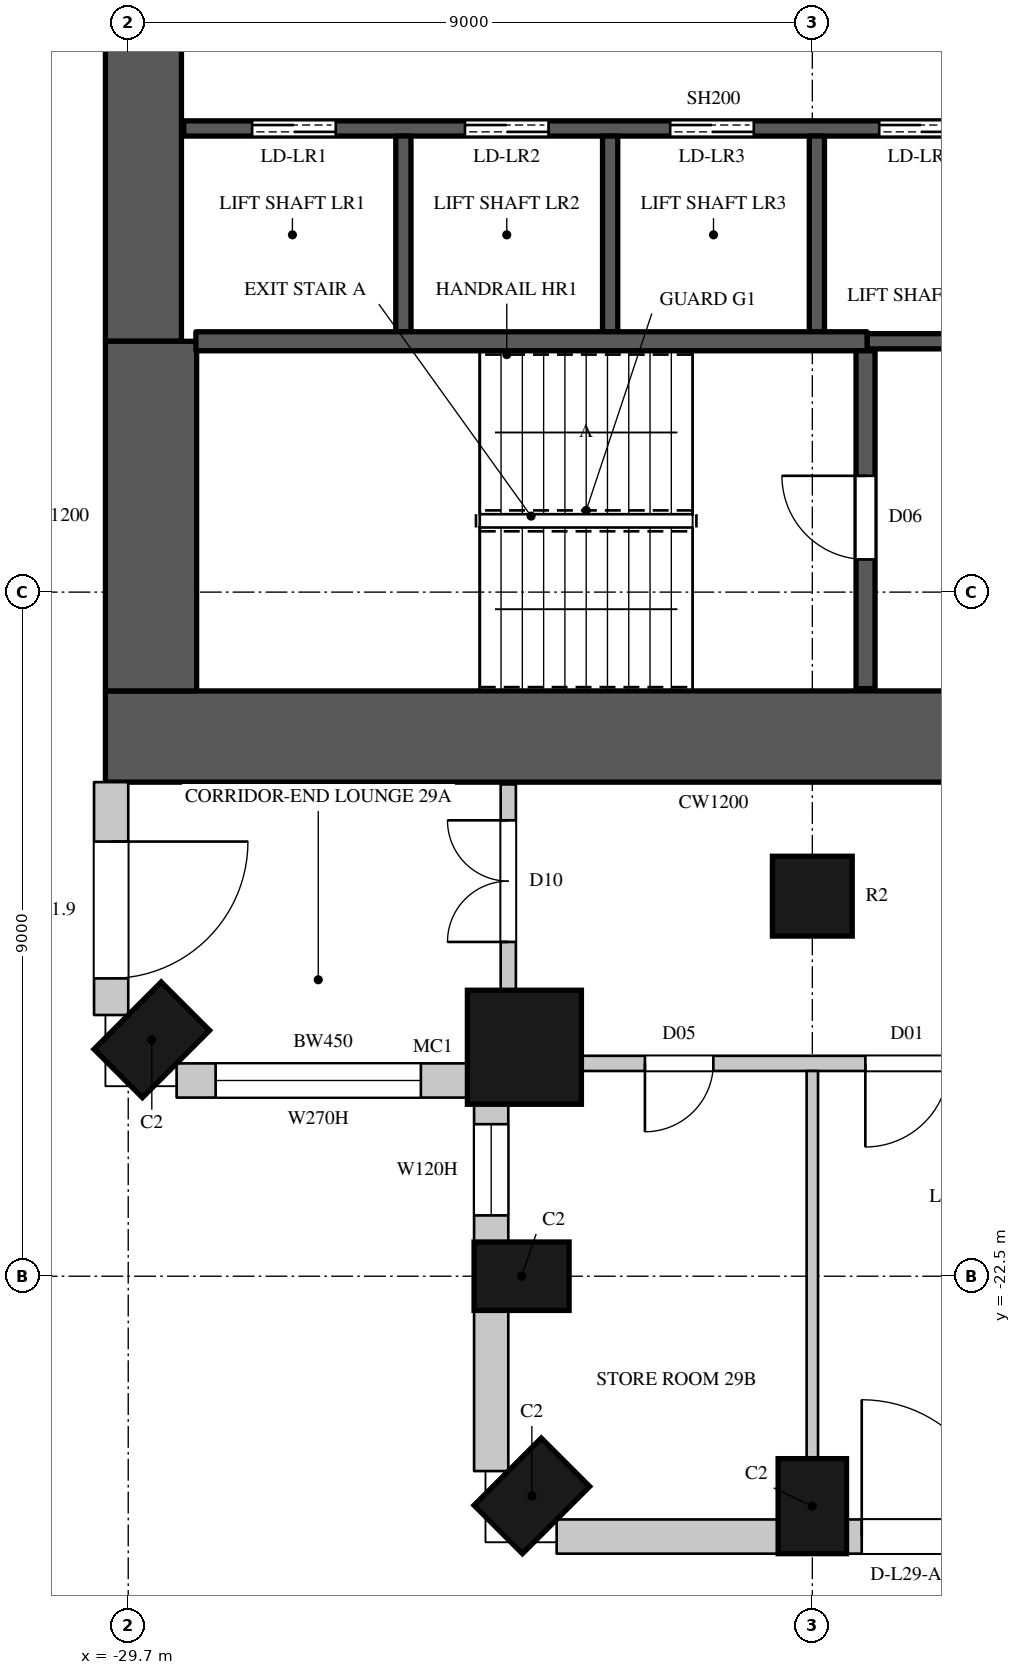
"""IFC4 building model, lengths in metres.
Left out: names, types, materials, properties, quantities, classifications, styles, units other than length and angle.
Written with IfcOpenShell. Run it as: python <this file> out.ifc"""

import sys

from ifc_helpers import new_model, si_unit, direction, frame, frame_2d, origin, origin_2d, place, context, subcontext, project, spatial, rectangle, circle, extrude, element, fill, save


model = new_model("IFC4")
c1 = context("Model", 3, precision=1e-05, world=origin(), true_north=direction((0.0, 1.0)))
c2 = subcontext(c1, "Body", "Model", "MODEL_VIEW")
j1 = project(units=[si_unit("LENGTHUNIT", "METRE"), si_unit("PLANEANGLEUNIT", "RADIAN")], contexts=[c1])
p1 = place(None, origin())
s1 = spatial("IfcSite", under=j1, at=p1, CompositionType="ELEMENT")
p2 = place(p1, origin())
s2 = spatial("IfcBuilding", under=s1, at=p2, CompositionType="ELEMENT")
p3 = place(p2, frame((0.0, 0.0, 134.7)))
s3 = spatial("IfcBuildingStorey", under=s2, at=p3, CompositionType="ELEMENT", Elevation=134.7)
p4 = place(p3, frame((-29.39, -19.39, 0.0), z_axis=(0.0, 0.0, 1.0), x_axis=(0.707106781187, -0.707106781187, 0.0)))
e1 = element("IfcColumn", 1, at=p4, inside=s3, PredefinedType="COLUMN", context=c2, shape_type="SweptSolid", body=[
    extrude(rectangle(XDim=0.9, YDim=1.25, at=origin_2d()), origin(), (0.0, 0.0, 1.0), 3.6),
])
p5 = place(p3, frame((-24.488, -19.488, 0.0), z_axis=(0.0, 0.0, 1.0), x_axis=(1.0, 0.0, 0.0)))
e2 = element("IfcColumn", 2, at=p5, inside=s3, PredefinedType="COLUMN", context=c2, shape_type="SweptSolid", body=[
    extrude(circle(Radius=0.75, at=origin_2d()), origin(), (0.0, 0.0, 1.0), 3.6),
])
for number, where, z_axis, x_axis in (
    (3, (-24.525, -22.5, 0.0), (0.0, 0.0, 1.0), (0.0, -1.0, 0.0)),
    (4, (-24.39, -25.39, 0.0), (0.0, 0.0, 1.0), (0.707, -0.707, 0.0)),
    (5, (-20.7, -25.525, 0.0), (0.0, 0.0, 1.0), (1.0, 0.0, 0.0)),
):
    element("IfcColumn", number, at=place(p3, frame(where, z_axis=z_axis, x_axis=x_axis)), inside=s3, PredefinedType="COLUMN", context=c2, shape_type="SweptSolid", body=[
        extrude(rectangle(XDim=0.9, YDim=1.25, at=origin_2d()), origin(), (0.0, 0.0, 1.0), 3.6),
    ])
p6 = place(p3, frame((-20.7, -17.5, 0.0), z_axis=(0.0, 0.0, 1.0), x_axis=(1.0, 0.0, 0.0)))
e6 = element("IfcColumn", 6, at=p6, inside=s3, PredefinedType="COLUMN", context=c2, shape_type="SweptSolid", body=[
    extrude(circle(Radius=0.525, at=origin_2d()), origin(), (0.0, 0.0, 1.0), 3.6),
])
p7 = place(p3, frame((-29.925, -16.0, 0.0), z_axis=(0.0, 0.0, 1.0), x_axis=(0.0, -1.0, 0.0)))
e7 = element("IfcWall", 7, at=p7, inside=s3, PredefinedType="SOLIDWALL", context=c2, shape_type="SweptSolid", body=[
    extrude(rectangle(XDim=3.064, YDim=0.45, at=frame_2d((1.532, 0.0))), origin(), (0.0, 0.0, 1.0), 3.3),
])
p8 = place(p7, frame((0.782, 0.0, 0.0)))
e8 = element("IfcOpeningElement", 8, at=p8, cuts=e7, PredefinedType="OPENING", context=c2, shape_type="SweptSolid", body=[
    extrude(rectangle(XDim=1.8, YDim=2.4, at=frame_2d((0.9, 1.2))), frame((0.0, 0.235, 0.0), z_axis=(0.0, -1.0, 0.0), x_axis=(1.0, 0.0, 0.0)), (0.0, 0.0, 1.0), 0.47),
])
p9 = place(p3, frame((-29.064, -19.925, 0.0), z_axis=(0.0, 0.0, 1.0), x_axis=(1.0, 0.0, 0.0)))
e9 = element("IfcWall", 9, at=p9, inside=s3, PredefinedType="SOLIDWALL", context=c2, shape_type="SweptSolid", body=[
    extrude(rectangle(XDim=3.857, YDim=0.45, at=frame_2d((1.928, 0.0))), origin(), (0.0, 0.0, 1.0), 3.3),
])
p10 = place(p9, frame((0.514, 0.0, 1.05)))
e10 = element("IfcOpeningElement", 10, at=p10, cuts=e9, PredefinedType="OPENING", context=c2, shape_type="SweptSolid", body=[
    extrude(rectangle(XDim=2.7, YDim=2.0, at=frame_2d((1.35, 1.0))), frame((0.0, 0.235, 0.0), z_axis=(0.0, -1.0, 0.0), x_axis=(1.0, 0.0, 0.0)), (0.0, 0.0, 1.0), 0.47),
])
p11 = place(p3, frame((-24.925, -20.207, 0.0), z_axis=(0.0, 0.0, 1.0), x_axis=(0.0, -1.0, 0.0)))
e11 = element("IfcWall", 11, at=p11, inside=s3, PredefinedType="SOLIDWALL", context=c2, shape_type="SweptSolid", body=[
    extrude(rectangle(XDim=1.843, YDim=0.45, at=frame_2d((0.921, 0.0))), origin(), (0.0, 0.0, 1.0), 3.3),
])
p12 = place(p11, frame((0.293, 0.0, 1.05)))
e12 = element("IfcOpeningElement", 12, at=p12, cuts=e11, PredefinedType="OPENING", context=c2, shape_type="SweptSolid", body=[
    extrude(rectangle(XDim=1.2, YDim=2.0, at=frame_2d((0.6, 1.0))), frame((0.0, 0.235, 0.0), z_axis=(0.0, -1.0, 0.0), x_axis=(1.0, 0.0, 0.0)), (0.0, 0.0, 1.0), 0.47),
])
p13 = place(p3, frame((-24.925, -22.95, 0.0), z_axis=(0.0, 0.0, 1.0), x_axis=(0.0, -1.0, 0.0)))
e13 = element("IfcWall", 13, at=p13, inside=s3, PredefinedType="SOLIDWALL", context=c2, shape_type="SweptSolid", body=[
    extrude(rectangle(XDim=2.114, YDim=0.45, at=frame_2d((1.057, 0.0))), origin(), (0.0, 0.0, 1.0), 3.3),
])
p14 = place(p3, frame((-24.064, -25.925, 0.0), z_axis=(0.0, 0.0, 1.0), x_axis=(1.0, 0.0, 0.0)))
e14 = element("IfcWall", 14, at=p14, inside=s3, PredefinedType="SOLIDWALL", context=c2, shape_type="SweptSolid", body=[
    extrude(rectangle(XDim=2.914, YDim=0.45, at=frame_2d((1.457, 0.0))), origin(), (0.0, 0.0, 1.0), 3.3),
])
p15 = place(p3, frame((-20.25, -25.925, 0.0), z_axis=(0.0, 0.0, 1.0), x_axis=(1.0, 0.0, 0.0)))
e15 = element("IfcWall", 15, at=p15, inside=s3, PredefinedType="SOLIDWALL", context=c2, shape_type="SweptSolid", body=[
    extrude(rectangle(XDim=8.1, YDim=0.45, at=frame_2d((4.05, 0.0))), origin(), (0.0, 0.0, 1.0), 3.3),
])
p16 = place(p15, frame((0.2, 0.0, 0.0)))
e16 = element("IfcOpeningElement", 16, at=p16, cuts=e15, PredefinedType="OPENING", context=c2, shape_type="SweptSolid", body=[
    extrude(rectangle(XDim=1.8, YDim=2.4, at=frame_2d((0.9, 1.2))), frame((0.0, 0.235, 0.0), z_axis=(0.0, -1.0, 0.0), x_axis=(1.0, 0.0, 0.0)), (0.0, 0.0, 1.0), 0.47),
])
p17 = place(p15, frame((2.2, 0.0, 1.05)))
e17 = element("IfcOpeningElement", 17, at=p17, cuts=e15, PredefinedType="OPENING", context=c2, shape_type="SweptSolid", body=[
    extrude(rectangle(XDim=1.2, YDim=2.0, at=frame_2d((0.6, 1.0))), frame((0.0, 0.235, 0.0), z_axis=(0.0, -1.0, 0.0), x_axis=(1.0, 0.0, 0.0)), (0.0, 0.0, 1.0), 0.47),
])
p18 = place(p15, frame((4.7, 0.0, 0.0)))
e18 = element("IfcOpeningElement", 18, at=p18, cuts=e15, PredefinedType="OPENING", context=c2, shape_type="SweptSolid", body=[
    extrude(rectangle(XDim=1.8, YDim=2.4, at=frame_2d((0.9, 1.2))), frame((0.0, 0.235, 0.0), z_axis=(0.0, -1.0, 0.0), x_axis=(1.0, 0.0, 0.0)), (0.0, 0.0, 1.0), 0.47),
])
p19 = place(p15, frame((6.7, 0.0, 1.05)))
e19 = element("IfcOpeningElement", 19, at=p19, cuts=e15, PredefinedType="OPENING", context=c2, shape_type="SweptSolid", body=[
    extrude(rectangle(XDim=1.2, YDim=2.0, at=frame_2d((0.6, 1.0))), frame((0.0, 0.235, 0.0), z_axis=(0.0, -1.0, 0.0), x_axis=(1.0, 0.0, 0.0)), (0.0, 0.0, 1.0), 0.47),
])
p20 = place(p3, frame((-30.0, -15.4, 0.0), z_axis=(0.0, 0.0, 1.0), x_axis=(1.0, 0.0, 0.0)))
e20 = element("IfcWall", 20, at=p20, inside=s3, PredefinedType="SHEAR", context=c2, shape_type="SweptSolid", body=[
    extrude(rectangle(XDim=16.0, YDim=1.2, at=frame_2d((8.0, 0.0))), origin(), (0.0, 0.0, 1.0), 3.6),
])
p21 = place(p20, frame((13.4, 0.0, 0.0)))
e21 = element("IfcOpeningElement", 21, at=p21, cuts=e20, PredefinedType="OPENING", context=c2, shape_type="SweptSolid", body=[
    extrude(rectangle(XDim=1.5, YDim=2.4, at=frame_2d((0.75, 1.2))), frame((0.0, 0.61, 0.0), z_axis=(0.0, -1.0, 0.0), x_axis=(1.0, 0.0, 0.0)), (0.0, 0.0, 1.0), 1.22),
])
p22 = place(p3, frame((-29.5, -10.2, 0.0), z_axis=(0.0, 0.0, 1.0), x_axis=(0.0, 1.0, 0.0)))
e22 = element("IfcWall", 22, at=p22, inside=s3, PredefinedType="SHEAR", context=c2, shape_type="SweptSolid", body=[
    extrude(rectangle(XDim=20.4, YDim=1.0, at=frame_2d((10.2, 0.0))), origin(), (0.0, 0.0, 1.0), 3.6),
])
p23 = place(p3, frame((-29.4, -14.8, 0.0), z_axis=(0.0, 0.0, 1.0), x_axis=(0.0, 1.0, 0.0)))
e23 = element("IfcWall", 23, at=p23, inside=s3, PredefinedType="SHEAR", context=c2, shape_type="SweptSolid", body=[
    extrude(rectangle(XDim=4.6, YDim=1.2, at=frame_2d((2.3, 0.0))), origin(), (0.0, 0.0, 1.0), 3.6),
])
p24 = place(p3, frame((-24.7, -18.752, 0.0), z_axis=(0.0, 0.0, 1.0), x_axis=(0.0, 1.0, 0.0)))
e24 = element("IfcWall", 24, at=p24, inside=s3, PredefinedType="PARTITIONING", context=c2, shape_type="SweptSolid", body=[
    extrude(rectangle(XDim=2.722, YDim=0.2, at=frame_2d((1.361, 0.0))), origin(), (0.0, 0.0, 1.0), 3.3),
])
p25 = place(p24, frame((0.65, 0.0, 0.0)))
e25 = element("IfcOpeningElement", 25, at=p25, cuts=e24, PredefinedType="OPENING", context=c2, shape_type="SweptSolid", body=[
    extrude(rectangle(XDim=1.6, YDim=2.4, at=frame_2d((0.8, 1.2))), frame((0.0, 0.11, 0.0), z_axis=(0.0, -1.0, 0.0), x_axis=(1.0, 0.0, 0.0)), (0.0, 0.0, 1.0), 0.22),
])
p26 = place(p3, frame((-23.752, -19.7, 0.0), z_axis=(0.0, 0.0, 1.0), x_axis=(1.0, 0.0, 0.0)))
e26 = element("IfcWall", 26, at=p26, inside=s3, PredefinedType="PARTITIONING", context=c2, shape_type="SweptSolid", body=[
    extrude(rectangle(XDim=5.152, YDim=0.2, at=frame_2d((2.576, 0.0))), origin(), (0.0, 0.0, 1.0), 3.3),
])
p27 = place(p26, frame((0.85, 0.0, 0.0)))
e27 = element("IfcOpeningElement", 27, at=p27, cuts=e26, PredefinedType="OPENING", context=c2, shape_type="SweptSolid", body=[
    extrude(rectangle(XDim=0.9, YDim=2.2, at=frame_2d((0.45, 1.1))), frame((0.0, 0.11, 0.0), z_axis=(0.0, -1.0, 0.0), x_axis=(1.0, 0.0, 0.0)), (0.0, 0.0, 1.0), 0.22),
])
p28 = place(p26, frame((3.75, 0.0, 0.0)))
e28 = element("IfcOpeningElement", 28, at=p28, cuts=e26, PredefinedType="OPENING", context=c2, shape_type="SweptSolid", body=[
    extrude(rectangle(XDim=1.1, YDim=2.4, at=frame_2d((0.55, 1.2))), frame((0.0, 0.11, 0.0), z_axis=(0.0, -1.0, 0.0), x_axis=(1.0, 0.0, 0.0)), (0.0, 0.0, 1.0), 0.22),
])
p29 = place(p3, frame((-20.7, -24.9, 0.0), z_axis=(0.0, 0.0, 1.0), x_axis=(0.0, 1.0, 0.0)))
e29 = element("IfcWall", 29, at=p29, inside=s3, PredefinedType="PARTITIONING", context=c2, shape_type="SweptSolid", body=[
    extrude(rectangle(XDim=5.1, YDim=0.15, at=frame_2d((2.55, 0.0))), origin(), (0.0, 0.0, 1.0), 2.75),
])
p30 = place(p3, frame((-28.97, -7.4, 0.0), z_axis=(0.0, 0.0, 1.0), x_axis=(1.0, 0.0, 0.0)))
e30 = element("IfcWall", 30, at=p30, inside=s3, PredefinedType="SHEAR", context=c2, shape_type="SweptSolid", body=[
    extrude(rectangle(XDim=13.94, YDim=0.2, at=frame_2d((6.97, 0.0))), origin(), (0.0, 0.0, 1.0), 3.3),
])
p31 = place(p30, frame((0.9, 0.0, 0.0)))
e31 = element("IfcOpeningElement", 31, at=p31, cuts=e30, PredefinedType="OPENING", context=c2, shape_type="SweptSolid", body=[
    extrude(rectangle(XDim=1.1, YDim=2.2, at=frame_2d((0.55, 1.1))), frame((0.0, 0.11, 0.0), z_axis=(0.0, -1.0, 0.0), x_axis=(1.0, 0.0, 0.0)), (0.0, 0.0, 1.0), 0.22),
])
p32 = place(p30, frame((3.7, 0.0, 0.0)))
e32 = element("IfcOpeningElement", 32, at=p32, cuts=e30, PredefinedType="OPENING", context=c2, shape_type="SweptSolid", body=[
    extrude(rectangle(XDim=1.1, YDim=2.2, at=frame_2d((0.55, 1.1))), frame((0.0, 0.11, 0.0), z_axis=(0.0, -1.0, 0.0), x_axis=(1.0, 0.0, 0.0)), (0.0, 0.0, 1.0), 0.22),
])
p33 = place(p30, frame((6.4, 0.0, 0.0)))
e33 = element("IfcOpeningElement", 33, at=p33, cuts=e30, PredefinedType="OPENING", context=c2, shape_type="SweptSolid", body=[
    extrude(rectangle(XDim=1.1, YDim=2.2, at=frame_2d((0.55, 1.1))), frame((0.0, 0.11, 0.0), z_axis=(0.0, -1.0, 0.0), x_axis=(1.0, 0.0, 0.0)), (0.0, 0.0, 1.0), 0.22),
])
p34 = place(p30, frame((9.15, 0.0, 0.0)))
e34 = element("IfcOpeningElement", 34, at=p34, cuts=e30, PredefinedType="OPENING", context=c2, shape_type="SweptSolid", body=[
    extrude(rectangle(XDim=1.1, YDim=2.2, at=frame_2d((0.55, 1.1))), frame((0.0, 0.11, 0.0), z_axis=(0.0, -1.0, 0.0), x_axis=(1.0, 0.0, 0.0)), (0.0, 0.0, 1.0), 0.22),
])
for number, where, z_axis, x_axis in (
    (35, (-26.08, -10.075, 0.0), (0.0, 0.0, 1.0), (0.0, 1.0, 0.0)),
    (36, (-23.36, -10.075, 0.0), (0.0, 0.0, 1.0), (0.0, 1.0, 0.0)),
    (37, (-20.64, -10.075, 0.0), (0.0, 0.0, 1.0), (0.0, 1.0, 0.0)),
):
    element("IfcWall", number, at=place(p3, frame(where, z_axis=z_axis, x_axis=x_axis)), inside=s3, PredefinedType="SHEAR", context=c2, shape_type="SweptSolid", body=[
        extrude(rectangle(XDim=2.575, YDim=0.2, at=frame_2d((1.288, 0.0))), origin(), (0.0, 0.0, 1.0), 3.6),
    ])
p35 = place(p3, frame((-19.98, -10.2, 0.0), z_axis=(0.0, 0.0, 1.0), x_axis=(1.0, 0.0, 0.0)))
e38 = element("IfcWall", 38, at=p35, inside=s3, PredefinedType="SHEAR", context=c2, shape_type="SweptSolid", body=[
    extrude(rectangle(XDim=4.95, YDim=0.2, at=frame_2d((2.475, 0.0))), origin(), (0.0, 0.0, 1.0), 3.3),
])
p36 = place(p35, frame((2.95, 0.0, 0.0)))
e39 = element("IfcOpeningElement", 39, at=p36, cuts=e38, PredefinedType="OPENING", context=c2, shape_type="SweptSolid", body=[
    extrude(rectangle(XDim=1.1, YDim=2.2, at=frame_2d((0.55, 1.1))), frame((0.0, 0.11, 0.0), z_axis=(0.0, -1.0, 0.0), x_axis=(1.0, 0.0, 0.0)), (0.0, 0.0, 1.0), 0.22),
])
p37 = place(p3, frame((-28.81, -10.2, 0.0), z_axis=(0.0, 0.0, 1.0), x_axis=(1.0, 0.0, 0.0)))
e40 = element("IfcWall", 40, at=p37, inside=s3, PredefinedType="SHEAR", context=c2, shape_type="SweptSolid", body=[
    extrude(rectangle(XDim=8.83, YDim=0.25, at=frame_2d((4.415, 0.0))), origin(), (0.0, 0.0, 1.0), 3.3),
])
p38 = place(p3, frame((-20.0, -14.77, 0.0), z_axis=(0.0, 0.0, 1.0), x_axis=(0.0, 1.0, 0.0)))
e41 = element("IfcWall", 41, at=p38, inside=s3, PredefinedType="SHEAR", context=c2, shape_type="SweptSolid", body=[
    extrude(rectangle(XDim=4.445, YDim=0.25, at=frame_2d((2.223, 0.0))), origin(), (0.0, 0.0, 1.0), 3.3),
])
p39 = place(p38, frame((1.7, 0.0, 0.0)))
e42 = element("IfcOpeningElement", 42, at=p39, cuts=e41, PredefinedType="OPENING", context=c2, shape_type="SweptSolid", body=[
    extrude(rectangle(XDim=1.1, YDim=2.2, at=frame_2d((0.55, 1.1))), frame((0.0, 0.135, 0.0), z_axis=(0.0, -1.0, 0.0), x_axis=(1.0, 0.0, 0.0)), (0.0, 0.0, 1.0), 0.27),
])
p40 = place(p8, origin())
e43 = element("IfcDoor", 43, at=p40, inside=s3, OperationType="SLIDING_TO_LEFT", PredefinedType="DOOR", context=c2, shape_type="SweptSolid", body=[
    extrude(rectangle(XDim=1.8, YDim=2.4, at=frame_2d((0.9, 1.2))), frame((0.0, 0.13, 0.0), z_axis=(0.0, -1.0, 0.0), x_axis=(1.0, 0.0, 0.0)), (0.0, 0.0, 1.0), 0.05),
])
fill(e8, e43)
p41 = place(p10, origin())
e44 = element("IfcWindow", 44, at=p41, inside=s3, PartitioningType="SINGLE_PANEL", PredefinedType="WINDOW", context=c2, shape_type="SweptSolid", body=[
    extrude(rectangle(XDim=2.7, YDim=2.0, at=frame_2d((1.35, 1.0))), frame((0.0, 0.135, 0.0), z_axis=(0.0, -1.0, 0.0), x_axis=(1.0, 0.0, 0.0)), (0.0, 0.0, 1.0), 0.06),
])
fill(e10, e44)
p42 = place(p12, origin())
e45 = element("IfcWindow", 45, at=p42, inside=s3, PartitioningType="SINGLE_PANEL", PredefinedType="WINDOW", context=c2, shape_type="SweptSolid", body=[
    extrude(rectangle(XDim=1.2, YDim=2.0, at=frame_2d((0.6, 1.0))), frame((0.0, 0.135, 0.0), z_axis=(0.0, -1.0, 0.0), x_axis=(1.0, 0.0, 0.0)), (0.0, 0.0, 1.0), 0.06),
])
fill(e12, e45)
p43 = place(p16, origin())
e46 = element("IfcDoor", 46, at=p43, inside=s3, OperationType="SLIDING_TO_LEFT", PredefinedType="DOOR", context=c2, shape_type="SweptSolid", body=[
    extrude(rectangle(XDim=1.8, YDim=2.4, at=frame_2d((0.9, 1.2))), frame((0.0, 0.13, 0.0), z_axis=(0.0, -1.0, 0.0), x_axis=(1.0, 0.0, 0.0)), (0.0, 0.0, 1.0), 0.05),
])
fill(e16, e46)
p44 = place(p39, origin())
e47 = element("IfcDoor", 47, at=p44, inside=s3, OperationType="SINGLE_SWING_RIGHT", PredefinedType="DOOR", context=c2, shape_type="SweptSolid", body=[
    extrude(rectangle(XDim=1.1, YDim=2.2, at=frame_2d((0.55, 1.1))), frame((0.0, 0.025, 0.0), z_axis=(0.0, -1.0, 0.0), x_axis=(1.0, 0.0, 0.0)), (0.0, 0.0, 1.0), 0.05),
])
fill(e42, e47)
p45 = place(p31, origin())
e48 = element("IfcDoor", 48, at=p45, inside=s3, OperationType="DOUBLE_DOOR_SLIDING", PredefinedType="DOOR", context=c2, shape_type="SweptSolid", body=[
    extrude(rectangle(XDim=1.1, YDim=2.2, at=frame_2d((0.55, 1.1))), frame((0.0, 0.025, 0.0), z_axis=(0.0, -1.0, 0.0), x_axis=(1.0, 0.0, 0.0)), (0.0, 0.0, 1.0), 0.05),
])
fill(e31, e48)
p46 = place(p32, origin())
e49 = element("IfcDoor", 49, at=p46, inside=s3, OperationType="DOUBLE_DOOR_SLIDING", PredefinedType="DOOR", context=c2, shape_type="SweptSolid", body=[
    extrude(rectangle(XDim=1.1, YDim=2.2, at=frame_2d((0.55, 1.1))), frame((0.0, 0.025, 0.0), z_axis=(0.0, -1.0, 0.0), x_axis=(1.0, 0.0, 0.0)), (0.0, 0.0, 1.0), 0.05),
])
fill(e32, e49)
p47 = place(p33, origin())
e50 = element("IfcDoor", 50, at=p47, inside=s3, OperationType="DOUBLE_DOOR_SLIDING", PredefinedType="DOOR", context=c2, shape_type="SweptSolid", body=[
    extrude(rectangle(XDim=1.1, YDim=2.2, at=frame_2d((0.55, 1.1))), frame((0.0, 0.025, 0.0), z_axis=(0.0, -1.0, 0.0), x_axis=(1.0, 0.0, 0.0)), (0.0, 0.0, 1.0), 0.05),
])
fill(e33, e50)
p48 = place(p34, origin())
e51 = element("IfcDoor", 51, at=p48, inside=s3, OperationType="DOUBLE_DOOR_SLIDING", PredefinedType="DOOR", context=c2, shape_type="SweptSolid", body=[
    extrude(rectangle(XDim=1.1, YDim=2.2, at=frame_2d((0.55, 1.1))), frame((0.0, 0.025, 0.0), z_axis=(0.0, -1.0, 0.0), x_axis=(1.0, 0.0, 0.0)), (0.0, 0.0, 1.0), 0.05),
])
fill(e34, e51)
p49 = place(p27, origin())
e52 = element("IfcDoor", 52, at=p49, inside=s3, OperationType="SINGLE_SWING_RIGHT", PredefinedType="DOOR", context=c2, shape_type="SweptSolid", body=[
    extrude(rectangle(XDim=0.9, YDim=2.2, at=frame_2d((0.45, 1.1))), frame((0.0, 0.025, 0.0), z_axis=(0.0, -1.0, 0.0), x_axis=(1.0, 0.0, 0.0)), (0.0, 0.0, 1.0), 0.05),
])
fill(e27, e52)
p50 = place(p25, origin())
e53 = element("IfcDoor", 53, at=p50, inside=s3, OperationType="DOUBLE_DOOR_SINGLE_SWING", PredefinedType="DOOR", context=c2, shape_type="SweptSolid", body=[
    extrude(rectangle(XDim=1.6, YDim=2.4, at=frame_2d((0.8, 1.2))), frame((0.0, 0.025, 0.0), z_axis=(0.0, -1.0, 0.0), x_axis=(1.0, 0.0, 0.0)), (0.0, 0.0, 1.0), 0.05),
])
fill(e25, e53)
p51 = place(p28, origin())
e54 = element("IfcDoor", 54, at=p51, inside=s3, OperationType="SINGLE_SWING_RIGHT", PredefinedType="DOOR", context=c2, shape_type="SweptSolid", body=[
    extrude(rectangle(XDim=1.1, YDim=2.4, at=frame_2d((0.55, 1.2))), frame((0.0, 0.025, 0.0), z_axis=(0.0, -1.0, 0.0), x_axis=(1.0, 0.0, 0.0)), (0.0, 0.0, 1.0), 0.05),
])
fill(e28, e54)
save(model, sys.argv[1])
